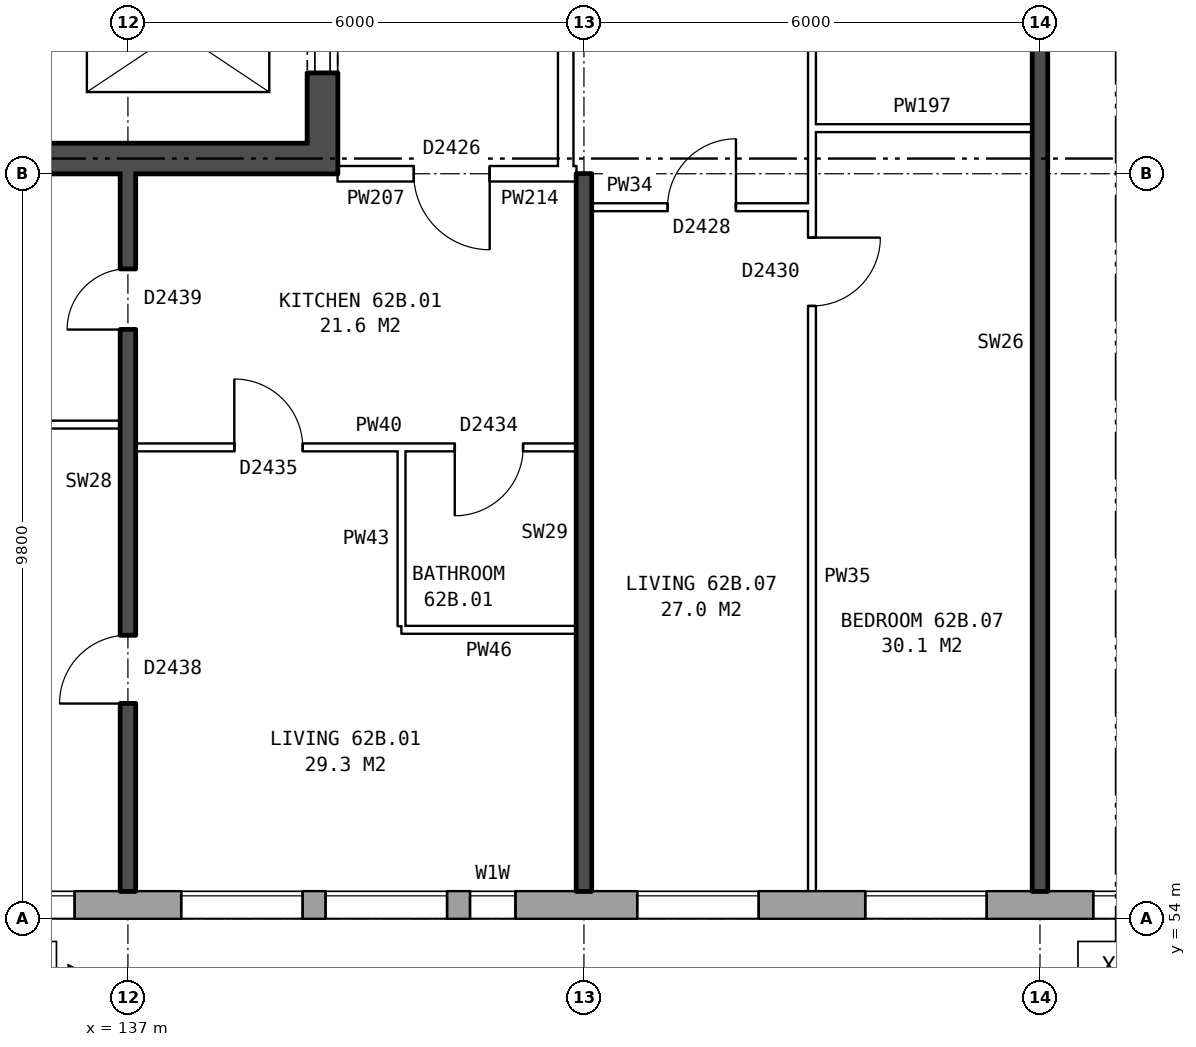
"""IFC4 building model, lengths in metres.
Left out: names, types, materials, properties, quantities, classifications, styles, units other than length and angle.
Written with IfcOpenShell. Run it as: python <this file> out.ifc"""

import sys

from ifc_helpers import new_model, si_unit, direction, frame, frame_2d, origin, place, context, subcontext, project, spatial, rectangle, extrude, element, fill, save


model = new_model("IFC4")
c1 = context("Model", 3, precision=1e-05, world=origin(), true_north=direction((0.0, 1.0)))
c2 = subcontext(c1, "Body", "Model", "MODEL_VIEW")
j1 = project(units=[si_unit("LENGTHUNIT", "METRE"), si_unit("PLANEANGLEUNIT", "RADIAN")], contexts=[c1])
p1 = place(None, origin())
s1 = spatial("IfcSite", under=j1, at=p1, CompositionType="ELEMENT")
p2 = place(p1, origin())
s2 = spatial("IfcBuilding", under=s1, at=p2, CompositionType="ELEMENT")
p3 = place(p2, frame((0.0, 0.0, 221.4)))
s3 = spatial("IfcBuildingStorey", under=s2, at=p3, CompositionType="ELEMENT", Elevation=221.4)
p4 = place(p3, frame((132.05, 54.18, 0.0), z_axis=(0.0, 0.0, 1.0), x_axis=(1.0, 0.0, 0.0)))
e1 = element("IfcWall", 1, at=p4, inside=s3, PredefinedType="STANDARD", context=c2, shape_type="SweptSolid", body=[
    extrude(rectangle(XDim=33.875, YDim=0.36, at=frame_2d((16.938, 0.0))), origin(), (0.0, 0.0, 1.0), 2.85),
])
p5 = place(p4, frame((2.65, 0.0, 0.8)))
e2 = element("IfcOpeningElement", 2, at=p5, cuts=e1, PredefinedType="OPENING", context=c2, shape_type="SweptSolid", body=[
    extrude(rectangle(XDim=1.6, YDim=1.8, at=frame_2d((0.8, 0.9))), frame((0.0, 0.19, 0.0), z_axis=(0.0, -1.0, 0.0), x_axis=(1.0, 0.0, 0.0)), (0.0, 0.0, 1.0), 0.38),
])
p6 = place(p4, frame((5.65, 0.0, 0.8)))
e3 = element("IfcOpeningElement", 3, at=p6, cuts=e1, PredefinedType="OPENING", context=c2, shape_type="SweptSolid", body=[
    extrude(rectangle(XDim=1.6, YDim=1.8, at=frame_2d((0.8, 0.9))), frame((0.0, 0.19, 0.0), z_axis=(0.0, -1.0, 0.0), x_axis=(1.0, 0.0, 0.0)), (0.0, 0.0, 1.0), 0.38),
])
p7 = place(p4, frame((7.55, 0.0, 0.8)))
e4 = element("IfcOpeningElement", 4, at=p7, cuts=e1, PredefinedType="OPENING", context=c2, shape_type="SweptSolid", body=[
    extrude(rectangle(XDim=1.6, YDim=1.8, at=frame_2d((0.8, 0.9))), frame((0.0, 0.19, 0.0), z_axis=(0.0, -1.0, 0.0), x_axis=(1.0, 0.0, 0.0)), (0.0, 0.0, 1.0), 0.38),
])
p8 = place(p4, frame((11.65, 0.0, 0.8)))
e5 = element("IfcOpeningElement", 5, at=p8, cuts=e1, PredefinedType="OPENING", context=c2, shape_type="SweptSolid", body=[
    extrude(rectangle(XDim=1.6, YDim=1.8, at=frame_2d((0.8, 0.9))), frame((0.0, 0.19, 0.0), z_axis=(0.0, -1.0, 0.0), x_axis=(1.0, 0.0, 0.0)), (0.0, 0.0, 1.0), 0.38),
])
p9 = place(p4, frame((14.65, 0.0, 0.8)))
e6 = element("IfcOpeningElement", 6, at=p9, cuts=e1, PredefinedType="OPENING", context=c2, shape_type="SweptSolid", body=[
    extrude(rectangle(XDim=1.6, YDim=1.8, at=frame_2d((0.8, 0.9))), frame((0.0, 0.19, 0.0), z_axis=(0.0, -1.0, 0.0), x_axis=(1.0, 0.0, 0.0)), (0.0, 0.0, 1.0), 0.38),
])
p10 = place(p4, frame((17.65, 0.0, 0.8)))
e7 = element("IfcOpeningElement", 7, at=p10, cuts=e1, PredefinedType="OPENING", context=c2, shape_type="SweptSolid", body=[
    extrude(rectangle(XDim=1.6, YDim=1.8, at=frame_2d((0.8, 0.9))), frame((0.0, 0.19, 0.0), z_axis=(0.0, -1.0, 0.0), x_axis=(1.0, 0.0, 0.0)), (0.0, 0.0, 1.0), 0.38),
])
p11 = place(p4, frame((20.65, 0.0, 0.8)))
e8 = element("IfcOpeningElement", 8, at=p11, cuts=e1, PredefinedType="OPENING", context=c2, shape_type="SweptSolid", body=[
    extrude(rectangle(XDim=1.6, YDim=1.8, at=frame_2d((0.8, 0.9))), frame((0.0, 0.19, 0.0), z_axis=(0.0, -1.0, 0.0), x_axis=(1.0, 0.0, 0.0)), (0.0, 0.0, 1.0), 0.38),
])
p12 = place(p4, frame((23.15, 0.0, 0.8)))
e9 = element("IfcOpeningElement", 9, at=p12, cuts=e1, PredefinedType="OPENING", context=c2, shape_type="SweptSolid", body=[
    extrude(rectangle(XDim=1.0, YDim=1.8, at=frame_2d((0.5, 0.9))), frame((0.0, 0.19, 0.0), z_axis=(0.0, -1.0, 0.0), x_axis=(1.0, 0.0, 0.0)), (0.0, 0.0, 1.0), 0.38),
])
p13 = place(p4, frame((26.65, 0.0, 0.8)))
e10 = element("IfcOpeningElement", 10, at=p13, cuts=e1, PredefinedType="OPENING", context=c2, shape_type="SweptSolid", body=[
    extrude(rectangle(XDim=1.6, YDim=1.8, at=frame_2d((0.8, 0.9))), frame((0.0, 0.19, 0.0), z_axis=(0.0, -1.0, 0.0), x_axis=(1.0, 0.0, 0.0)), (0.0, 0.0, 1.0), 0.38),
])
p14 = place(p4, frame((29.65, 0.0, 0.8)))
e11 = element("IfcOpeningElement", 11, at=p14, cuts=e1, PredefinedType="OPENING", context=c2, shape_type="SweptSolid", body=[
    extrude(rectangle(XDim=1.6, YDim=1.8, at=frame_2d((0.8, 0.9))), frame((0.0, 0.19, 0.0), z_axis=(0.0, -1.0, 0.0), x_axis=(1.0, 0.0, 0.0)), (0.0, 0.0, 1.0), 0.38),
])
p15 = place(p4, frame((9.45, 0.0, 1.7)))
e12 = element("IfcOpeningElement", 12, at=p15, cuts=e1, PredefinedType="OPENING", context=c2, shape_type="SweptSolid", body=[
    extrude(rectangle(XDim=0.6, YDim=0.9, at=frame_2d((0.3, 0.45))), frame((0.0, 0.19, 0.0), z_axis=(0.0, -1.0, 0.0), x_axis=(1.0, 0.0, 0.0)), (0.0, 0.0, 1.0), 0.38),
])
p16 = place(p3, frame((139.56, 63.8, 0.0), z_axis=(0.0, 0.0, 1.0), x_axis=(0.0, 1.0, 0.0)))
e13 = element("IfcWall", 13, at=p16, inside=s3, PredefinedType="SHEAR", context=c2, shape_type="SweptSolid", body=[
    extrude(rectangle(XDim=12.4, YDim=0.4, at=frame_2d((6.2, 0.0))), origin(), (0.0, 0.0, 1.0), 2.85),
])
p17 = place(p16, frame((1.325, 0.0, 0.0)))
e14 = element("IfcOpeningElement", 14, at=p17, cuts=e13, PredefinedType="OPENING", context=c2, shape_type="SweptSolid", body=[
    extrude(rectangle(XDim=1.1, YDim=2.1, at=frame_2d((0.55, 1.05))), frame((0.0, 0.21, 0.0), z_axis=(0.0, -1.0, 0.0), x_axis=(1.0, 0.0, 0.0)), (0.0, 0.0, 1.0), 0.42),
])
p18 = place(p16, frame((3.6, 0.0, 0.0)))
e15 = element("IfcOpeningElement", 15, at=p18, cuts=e13, PredefinedType="OPENING", context=c2, shape_type="SweptSolid", body=[
    extrude(rectangle(XDim=1.1, YDim=2.1, at=frame_2d((0.55, 1.05))), frame((0.0, 0.21, 0.0), z_axis=(0.0, -1.0, 0.0), x_axis=(1.0, 0.0, 0.0)), (0.0, 0.0, 1.0), 0.42),
])
p19 = place(p16, frame((5.8, 0.0, 0.0)))
e16 = element("IfcOpeningElement", 16, at=p19, cuts=e13, PredefinedType="OPENING", context=c2, shape_type="SweptSolid", body=[
    extrude(rectangle(XDim=1.1, YDim=2.1, at=frame_2d((0.55, 1.05))), frame((0.0, 0.21, 0.0), z_axis=(0.0, -1.0, 0.0), x_axis=(1.0, 0.0, 0.0)), (0.0, 0.0, 1.0), 0.42),
])
p20 = place(p16, frame((9.9, 0.0, 0.0)))
e17 = element("IfcOpeningElement", 17, at=p20, cuts=e13, PredefinedType="OPENING", context=c2, shape_type="SweptSolid", body=[
    extrude(rectangle(XDim=1.1, YDim=2.1, at=frame_2d((0.55, 1.05))), frame((0.0, 0.21, 0.0), z_axis=(0.0, -1.0, 0.0), x_axis=(1.0, 0.0, 0.0)), (0.0, 0.0, 1.0), 0.42),
])
p21 = place(p16, frame((8.125, 0.0, 0.0)))
e18 = element("IfcOpeningElement", 18, at=p21, cuts=e13, PredefinedType="OPENING", context=c2, shape_type="SweptSolid", body=[
    extrude(rectangle(XDim=0.85, YDim=2.1, at=frame_2d((0.425, 1.05))), frame((0.0, 0.21, 0.0), z_axis=(0.0, -1.0, 0.0), x_axis=(1.0, 0.0, 0.0)), (0.0, 0.0, 1.0), 0.42),
])
p22 = place(p3, frame((139.36, 64.0, 0.0), z_axis=(0.0, 0.0, 1.0), x_axis=(-1.0, 0.0, 0.0)))
e19 = element("IfcWall", 19, at=p22, inside=s3, PredefinedType="SHEAR", context=c2, shape_type="SweptSolid", body=[
    extrude(rectangle(XDim=7.6, YDim=0.4, at=frame_2d((3.8, 0.0))), origin(), (0.0, 0.0, 1.0), 2.85),
])
p23 = place(p3, frame((142.76, 63.9, 0.0), z_axis=(0.0, 0.0, 1.0), x_axis=(0.0, 1.0, 0.0)))
e20 = element("IfcWall", 20, at=p23, inside=s3, PredefinedType="PARTITIONING", context=c2, shape_type="SweptSolid", body=[
    extrude(rectangle(XDim=12.2, YDim=0.2, at=frame_2d((6.1, 0.0))), origin(), (0.0, 0.0, 1.0), 2.85),
])
p24 = place(p23, frame((5.1, 0.0, 0.0)))
e21 = element("IfcOpeningElement", 21, at=p24, cuts=e20, PredefinedType="OPENING", context=c2, shape_type="SweptSolid", body=[
    extrude(rectangle(XDim=2.0, YDim=2.1, at=frame_2d((1.0, 1.05))), frame((0.0, 0.11, 0.0), z_axis=(0.0, -1.0, 0.0), x_axis=(1.0, 0.0, 0.0)), (0.0, 0.0, 1.0), 0.22),
])
p25 = place(p3, frame((140.6, 57.8, 0.0), z_axis=(0.0, 0.0, 1.0), x_axis=(1.0, 0.0, 0.0)))
e22 = element("IfcWall", 22, at=p25, inside=s3, PredefinedType="PARTITIONING", context=c2, shape_type="SweptSolid", body=[
    extrude(rectangle(XDim=2.3, YDim=0.1, at=frame_2d((1.15, 0.0))), origin(), (0.0, 0.0, 1.0), 2.85),
])
p26 = place(p3, frame((137.1, 60.2, 0.0), z_axis=(0.0, 0.0, 1.0), x_axis=(1.0, 0.0, 0.0)))
e23 = element("IfcWall", 23, at=p26, inside=s3, PredefinedType="PARTITIONING", context=c2, shape_type="SweptSolid", body=[
    extrude(rectangle(XDim=5.8, YDim=0.1, at=frame_2d((2.9, 0.0))), origin(), (0.0, 0.0, 1.0), 2.85),
])
p27 = place(p26, frame((1.3, 0.0, 0.0)))
e24 = element("IfcOpeningElement", 24, at=p27, cuts=e23, PredefinedType="OPENING", context=c2, shape_type="SweptSolid", body=[
    extrude(rectangle(XDim=0.9, YDim=2.1, at=frame_2d((0.45, 1.05))), frame((0.0, 0.06, 0.0), z_axis=(0.0, -1.0, 0.0), x_axis=(1.0, 0.0, 0.0)), (0.0, 0.0, 1.0), 0.12),
])
p28 = place(p26, frame((4.2, 0.0, 0.0)))
e25 = element("IfcOpeningElement", 25, at=p28, cuts=e23, PredefinedType="OPENING", context=c2, shape_type="SweptSolid", body=[
    extrude(rectangle(XDim=0.9, YDim=2.1, at=frame_2d((0.45, 1.05))), frame((0.0, 0.06, 0.0), z_axis=(0.0, -1.0, 0.0), x_axis=(1.0, 0.0, 0.0)), (0.0, 0.0, 1.0), 0.12),
])
p29 = place(p3, frame((131.1, 60.5, 0.0), z_axis=(0.0, 0.0, 1.0), x_axis=(1.0, 0.0, 0.0)))
e26 = element("IfcWall", 26, at=p29, inside=s3, PredefinedType="PARTITIONING", context=c2, shape_type="SweptSolid", body=[
    extrude(rectangle(XDim=5.8, YDim=0.1, at=frame_2d((2.9, 0.0))), origin(), (0.0, 0.0, 1.0), 2.85),
])
p30 = place(p3, frame((143.1, 63.36, 0.0), z_axis=(0.0, 0.0, 1.0), x_axis=(1.0, 0.0, 0.0)))
e27 = element("IfcWall", 27, at=p30, inside=s3, PredefinedType="PARTITIONING", context=c2, shape_type="SweptSolid", body=[
    extrude(rectangle(XDim=2.9, YDim=0.1, at=frame_2d((1.45, 0.0))), origin(), (0.0, 0.0, 1.0), 2.85),
])
p31 = place(p30, frame((1.0, 0.0, 0.0)))
e28 = element("IfcOpeningElement", 28, at=p31, cuts=e27, PredefinedType="OPENING", context=c2, shape_type="SweptSolid", body=[
    extrude(rectangle(XDim=0.9, YDim=2.1, at=frame_2d((0.45, 1.05))), frame((0.0, 0.06, 0.0), z_axis=(0.0, -1.0, 0.0), x_axis=(1.0, 0.0, 0.0)), (0.0, 0.0, 1.0), 0.12),
])
p32 = place(p3, frame((139.76, 63.8, 0.0), z_axis=(0.0, 0.0, 1.0), x_axis=(1.0, 0.0, 0.0)))
e29 = element("IfcWall", 29, at=p32, inside=s3, PredefinedType="PARTITIONING", context=c2, shape_type="SweptSolid", body=[
    extrude(rectangle(XDim=3.0, YDim=0.2, at=frame_2d((1.5, 0.0))), origin(), (0.0, 0.0, 1.0), 2.85),
])
p33 = place(p32, frame((1.0, 0.0, 0.0)))
e30 = element("IfcOpeningElement", 30, at=p33, cuts=e29, PredefinedType="OPENING", context=c2, shape_type="SweptSolid", body=[
    extrude(rectangle(XDim=1.0, YDim=2.1, at=frame_2d((0.5, 1.05))), frame((0.0, 0.11, 0.0), z_axis=(0.0, -1.0, 0.0), x_axis=(1.0, 0.0, 0.0)), (0.0, 0.0, 1.0), 0.22),
])
p34 = place(p3, frame((142.76, 63.8, 0.0), z_axis=(0.0, 0.0, 1.0), x_axis=(1.0, 0.0, 0.0)))
e31 = element("IfcWall", 31, at=p34, inside=s3, PredefinedType="PARTITIONING", context=c2, shape_type="SweptSolid", body=[
    extrude(rectangle(XDim=0.14, YDim=0.2, at=frame_2d((0.07, 0.0))), origin(), (0.0, 0.0, 1.0), 2.85),
])
p35 = place(p3, frame((146.0, 64.4, 0.0), z_axis=(0.0, 0.0, 1.0), x_axis=(1.0, 0.0, 0.0)))
e32 = element("IfcWall", 32, at=p35, inside=s3, PredefinedType="PARTITIONING", context=c2, shape_type="SweptSolid", body=[
    extrude(rectangle(XDim=2.9, YDim=0.1, at=frame_2d((1.45, 0.0))), origin(), (0.0, 0.0, 1.0), 2.85),
])
p36 = place(p3, frame((137.0, 54.36, 0.0), z_axis=(0.0, 0.0, 1.0), x_axis=(0.0, 1.0, 0.0)))
e33 = element("IfcWall", 33, at=p36, inside=s3, PredefinedType="SOLIDWALL", context=c2, shape_type="SweptSolid", body=[
    extrude(rectangle(XDim=9.44, YDim=0.2, at=frame_2d((4.72, 0.0))), origin(), (0.0, 0.0, 1.0), 2.85),
])
p37 = place(p36, frame((2.47, 0.0, 0.0)))
e34 = element("IfcOpeningElement", 34, at=p37, cuts=e33, PredefinedType="OPENING", context=c2, shape_type="SweptSolid", body=[
    extrude(rectangle(XDim=0.9, YDim=2.1, at=frame_2d((0.45, 1.05))), frame((0.0, 0.11, 0.0), z_axis=(0.0, -1.0, 0.0), x_axis=(1.0, 0.0, 0.0)), (0.0, 0.0, 1.0), 0.22),
])
p38 = place(p36, frame((7.39, 0.0, 0.0)))
e35 = element("IfcOpeningElement", 35, at=p38, cuts=e33, PredefinedType="OPENING", context=c2, shape_type="SweptSolid", body=[
    extrude(rectangle(XDim=0.8, YDim=2.1, at=frame_2d((0.4, 1.05))), frame((0.0, 0.11, 0.0), z_axis=(0.0, -1.0, 0.0), x_axis=(1.0, 0.0, 0.0)), (0.0, 0.0, 1.0), 0.22),
])
p39 = place(p3, frame((140.6, 57.85, 0.0), z_axis=(0.0, 0.0, 1.0), x_axis=(0.0, 1.0, 0.0)))
e36 = element("IfcWall", 36, at=p39, inside=s3, PredefinedType="PARTITIONING", context=c2, shape_type="SweptSolid", body=[
    extrude(rectangle(XDim=2.3, YDim=0.1, at=frame_2d((1.15, 0.0))), origin(), (0.0, 0.0, 1.0), 2.85),
])
p40 = place(p3, frame((143.0, 54.36, 0.0), z_axis=(0.0, 0.0, 1.0), x_axis=(0.0, 1.0, 0.0)))
e37 = element("IfcWall", 37, at=p40, inside=s3, PredefinedType="SOLIDWALL", context=c2, shape_type="SweptSolid", body=[
    extrude(rectangle(XDim=9.44, YDim=0.2, at=frame_2d((4.72, 0.0))), origin(), (0.0, 0.0, 1.0), 2.85),
])
p41 = place(p3, frame((146.0, 54.36, 0.0), z_axis=(0.0, 0.0, 1.0), x_axis=(0.0, 1.0, 0.0)))
e38 = element("IfcWall", 38, at=p41, inside=s3, PredefinedType="PARTITIONING", context=c2, shape_type="SweptSolid", body=[
    extrude(rectangle(XDim=14.34, YDim=0.1, at=frame_2d((7.17, 0.0))), origin(), (0.0, 0.0, 1.0), 2.85),
])
p42 = place(p41, frame((7.7, 0.0, 0.0)))
e39 = element("IfcOpeningElement", 39, at=p42, cuts=e38, PredefinedType="OPENING", context=c2, shape_type="SweptSolid", body=[
    extrude(rectangle(XDim=0.9, YDim=2.1, at=frame_2d((0.45, 1.05))), frame((0.0, 0.06, 0.0), z_axis=(0.0, -1.0, 0.0), x_axis=(1.0, 0.0, 0.0)), (0.0, 0.0, 1.0), 0.12),
])
p43 = place(p41, frame((13.04, 0.0, 0.0)))
e40 = element("IfcOpeningElement", 40, at=p43, cuts=e38, PredefinedType="OPENING", context=c2, shape_type="SweptSolid", body=[
    extrude(rectangle(XDim=0.9, YDim=2.1, at=frame_2d((0.45, 1.05))), frame((0.0, 0.06, 0.0), z_axis=(0.0, -1.0, 0.0), x_axis=(1.0, 0.0, 0.0)), (0.0, 0.0, 1.0), 0.12),
])
p44 = place(p3, frame((149.0, 54.36, 0.0), z_axis=(0.0, 0.0, 1.0), x_axis=(0.0, 1.0, 0.0)))
e41 = element("IfcWall", 41, at=p44, inside=s3, PredefinedType="SOLIDWALL", context=c2, shape_type="SweptSolid", body=[
    extrude(rectangle(XDim=14.44, YDim=0.2, at=frame_2d((7.22, 0.0))), origin(), (0.0, 0.0, 1.0), 2.85),
])
p45 = place(p5, origin())
e42 = element("IfcWindow", 42, at=p45, inside=s3, PartitioningType="SINGLE_PANEL", PredefinedType="WINDOW", context=c2, shape_type="SweptSolid", body=[
    extrude(rectangle(XDim=1.6, YDim=1.8, at=frame_2d((0.8, 0.9))), frame((0.0, 0.15, 0.0), z_axis=(0.0, -1.0, 0.0), x_axis=(1.0, 0.0, 0.0)), (0.0, 0.0, 1.0), 0.06),
])
fill(e2, e42)
p46 = place(p6, origin())
e43 = element("IfcWindow", 43, at=p46, inside=s3, PartitioningType="SINGLE_PANEL", PredefinedType="WINDOW", context=c2, shape_type="SweptSolid", body=[
    extrude(rectangle(XDim=1.6, YDim=1.8, at=frame_2d((0.8, 0.9))), frame((0.0, 0.15, 0.0), z_axis=(0.0, -1.0, 0.0), x_axis=(1.0, 0.0, 0.0)), (0.0, 0.0, 1.0), 0.06),
])
fill(e3, e43)
p47 = place(p7, origin())
e44 = element("IfcWindow", 44, at=p47, inside=s3, PartitioningType="SINGLE_PANEL", PredefinedType="WINDOW", context=c2, shape_type="SweptSolid", body=[
    extrude(rectangle(XDim=1.6, YDim=1.8, at=frame_2d((0.8, 0.9))), frame((0.0, 0.15, 0.0), z_axis=(0.0, -1.0, 0.0), x_axis=(1.0, 0.0, 0.0)), (0.0, 0.0, 1.0), 0.06),
])
fill(e4, e44)
p48 = place(p8, origin())
e45 = element("IfcWindow", 45, at=p48, inside=s3, PartitioningType="SINGLE_PANEL", PredefinedType="WINDOW", context=c2, shape_type="SweptSolid", body=[
    extrude(rectangle(XDim=1.6, YDim=1.8, at=frame_2d((0.8, 0.9))), frame((0.0, 0.15, 0.0), z_axis=(0.0, -1.0, 0.0), x_axis=(1.0, 0.0, 0.0)), (0.0, 0.0, 1.0), 0.06),
])
fill(e5, e45)
p49 = place(p9, origin())
e46 = element("IfcWindow", 46, at=p49, inside=s3, PartitioningType="SINGLE_PANEL", PredefinedType="WINDOW", context=c2, shape_type="SweptSolid", body=[
    extrude(rectangle(XDim=1.6, YDim=1.8, at=frame_2d((0.8, 0.9))), frame((0.0, 0.15, 0.0), z_axis=(0.0, -1.0, 0.0), x_axis=(1.0, 0.0, 0.0)), (0.0, 0.0, 1.0), 0.06),
])
fill(e6, e46)
p50 = place(p10, origin())
e47 = element("IfcWindow", 47, at=p50, inside=s3, PartitioningType="SINGLE_PANEL", PredefinedType="WINDOW", context=c2, shape_type="SweptSolid", body=[
    extrude(rectangle(XDim=1.6, YDim=1.8, at=frame_2d((0.8, 0.9))), frame((0.0, 0.15, 0.0), z_axis=(0.0, -1.0, 0.0), x_axis=(1.0, 0.0, 0.0)), (0.0, 0.0, 1.0), 0.06),
])
fill(e7, e47)
p51 = place(p17, origin())
e48 = element("IfcDoor", 48, at=p51, inside=s3, OperationType="DOUBLE_DOOR_SLIDING", PredefinedType="DOOR", context=c2, shape_type="SweptSolid", body=[
    extrude(rectangle(XDim=1.1, YDim=2.1, at=frame_2d((0.55, 1.05))), frame((0.0, 0.185, 0.0), z_axis=(0.0, -1.0, 0.0), x_axis=(1.0, 0.0, 0.0)), (0.0, 0.0, 1.0), 0.05),
])
fill(e14, e48)
p52 = place(p37, origin())
e49 = element("IfcDoor", 49, at=p52, inside=s3, OperationType="SINGLE_SWING_LEFT", PredefinedType="DOOR", context=c2, shape_type="SweptSolid", body=[
    extrude(rectangle(XDim=0.9, YDim=2.1, at=frame_2d((0.45, 1.05))), frame((0.0, 0.025, 0.0), z_axis=(0.0, -1.0, 0.0), x_axis=(1.0, 0.0, 0.0)), (0.0, 0.0, 1.0), 0.05),
])
fill(e34, e49)
p53 = place(p33, frame((1.0, 0.0, 0.0), z_axis=(0.0, 0.0, 1.0), x_axis=(-1.0, 0.0, 0.0)))
e50 = element("IfcDoor", 50, at=p53, inside=s3, OperationType="SINGLE_SWING_LEFT", PredefinedType="DOOR", context=c2, shape_type="SweptSolid", body=[
    extrude(rectangle(XDim=1.0, YDim=2.1, at=frame_2d((0.5, 1.05))), frame((0.0, 0.025, 0.0), z_axis=(0.0, -1.0, 0.0), x_axis=(1.0, 0.0, 0.0)), (0.0, 0.0, 1.0), 0.05),
])
fill(e30, e50)
p54 = place(p27, origin())
e51 = element("IfcDoor", 51, at=p54, inside=s3, OperationType="SINGLE_SWING_LEFT", PredefinedType="DOOR", context=c2, shape_type="SweptSolid", body=[
    extrude(rectangle(XDim=0.9, YDim=2.1, at=frame_2d((0.45, 1.05))), frame((0.0, 0.025, 0.0), z_axis=(0.0, -1.0, 0.0), x_axis=(1.0, 0.0, 0.0)), (0.0, 0.0, 1.0), 0.05),
])
fill(e24, e51)
p55 = place(p38, origin())
e52 = element("IfcDoor", 52, at=p55, inside=s3, OperationType="SINGLE_SWING_LEFT", PredefinedType="DOOR", context=c2, shape_type="SweptSolid", body=[
    extrude(rectangle(XDim=0.8, YDim=2.1, at=frame_2d((0.4, 1.05))), frame((0.0, 0.025, 0.0), z_axis=(0.0, -1.0, 0.0), x_axis=(1.0, 0.0, 0.0)), (0.0, 0.0, 1.0), 0.05),
])
fill(e35, e52)
p56 = place(p28, frame((0.9, 0.0, 0.0), z_axis=(0.0, 0.0, 1.0), x_axis=(-1.0, 0.0, 0.0)))
e53 = element("IfcDoor", 53, at=p56, inside=s3, OperationType="SINGLE_SWING_RIGHT", PredefinedType="DOOR", context=c2, shape_type="SweptSolid", body=[
    extrude(rectangle(XDim=0.9, YDim=2.1, at=frame_2d((0.45, 1.05))), frame((0.0, 0.025, 0.0), z_axis=(0.0, -1.0, 0.0), x_axis=(1.0, 0.0, 0.0)), (0.0, 0.0, 1.0), 0.05),
])
fill(e25, e53)
p57 = place(p42, frame((0.9, 0.0, 0.0), z_axis=(0.0, 0.0, 1.0), x_axis=(-1.0, 0.0, 0.0)))
e54 = element("IfcDoor", 54, at=p57, inside=s3, OperationType="SINGLE_SWING_LEFT", PredefinedType="DOOR", context=c2, shape_type="SweptSolid", body=[
    extrude(rectangle(XDim=0.9, YDim=2.1, at=frame_2d((0.45, 1.05))), frame((0.0, 0.025, 0.0), z_axis=(0.0, -1.0, 0.0), x_axis=(1.0, 0.0, 0.0)), (0.0, 0.0, 1.0), 0.05),
])
fill(e39, e54)
p58 = place(p31, origin())
e55 = element("IfcDoor", 55, at=p58, inside=s3, OperationType="SINGLE_SWING_RIGHT", PredefinedType="DOOR", context=c2, shape_type="SweptSolid", body=[
    extrude(rectangle(XDim=0.9, YDim=2.1, at=frame_2d((0.45, 1.05))), frame((0.0, 0.025, 0.0), z_axis=(0.0, -1.0, 0.0), x_axis=(1.0, 0.0, 0.0)), (0.0, 0.0, 1.0), 0.05),
])
fill(e28, e55)
p59 = place(p15, origin())
e56 = element("IfcWindow", 56, at=p59, inside=s3, PartitioningType="SINGLE_PANEL", PredefinedType="WINDOW", context=c2, shape_type="SweptSolid", body=[
    extrude(rectangle(XDim=0.6, YDim=0.9, at=frame_2d((0.3, 0.45))), frame((0.0, 0.15, 0.0), z_axis=(0.0, -1.0, 0.0), x_axis=(1.0, 0.0, 0.0)), (0.0, 0.0, 1.0), 0.06),
])
fill(e12, e56)
save(model, sys.argv[1])
